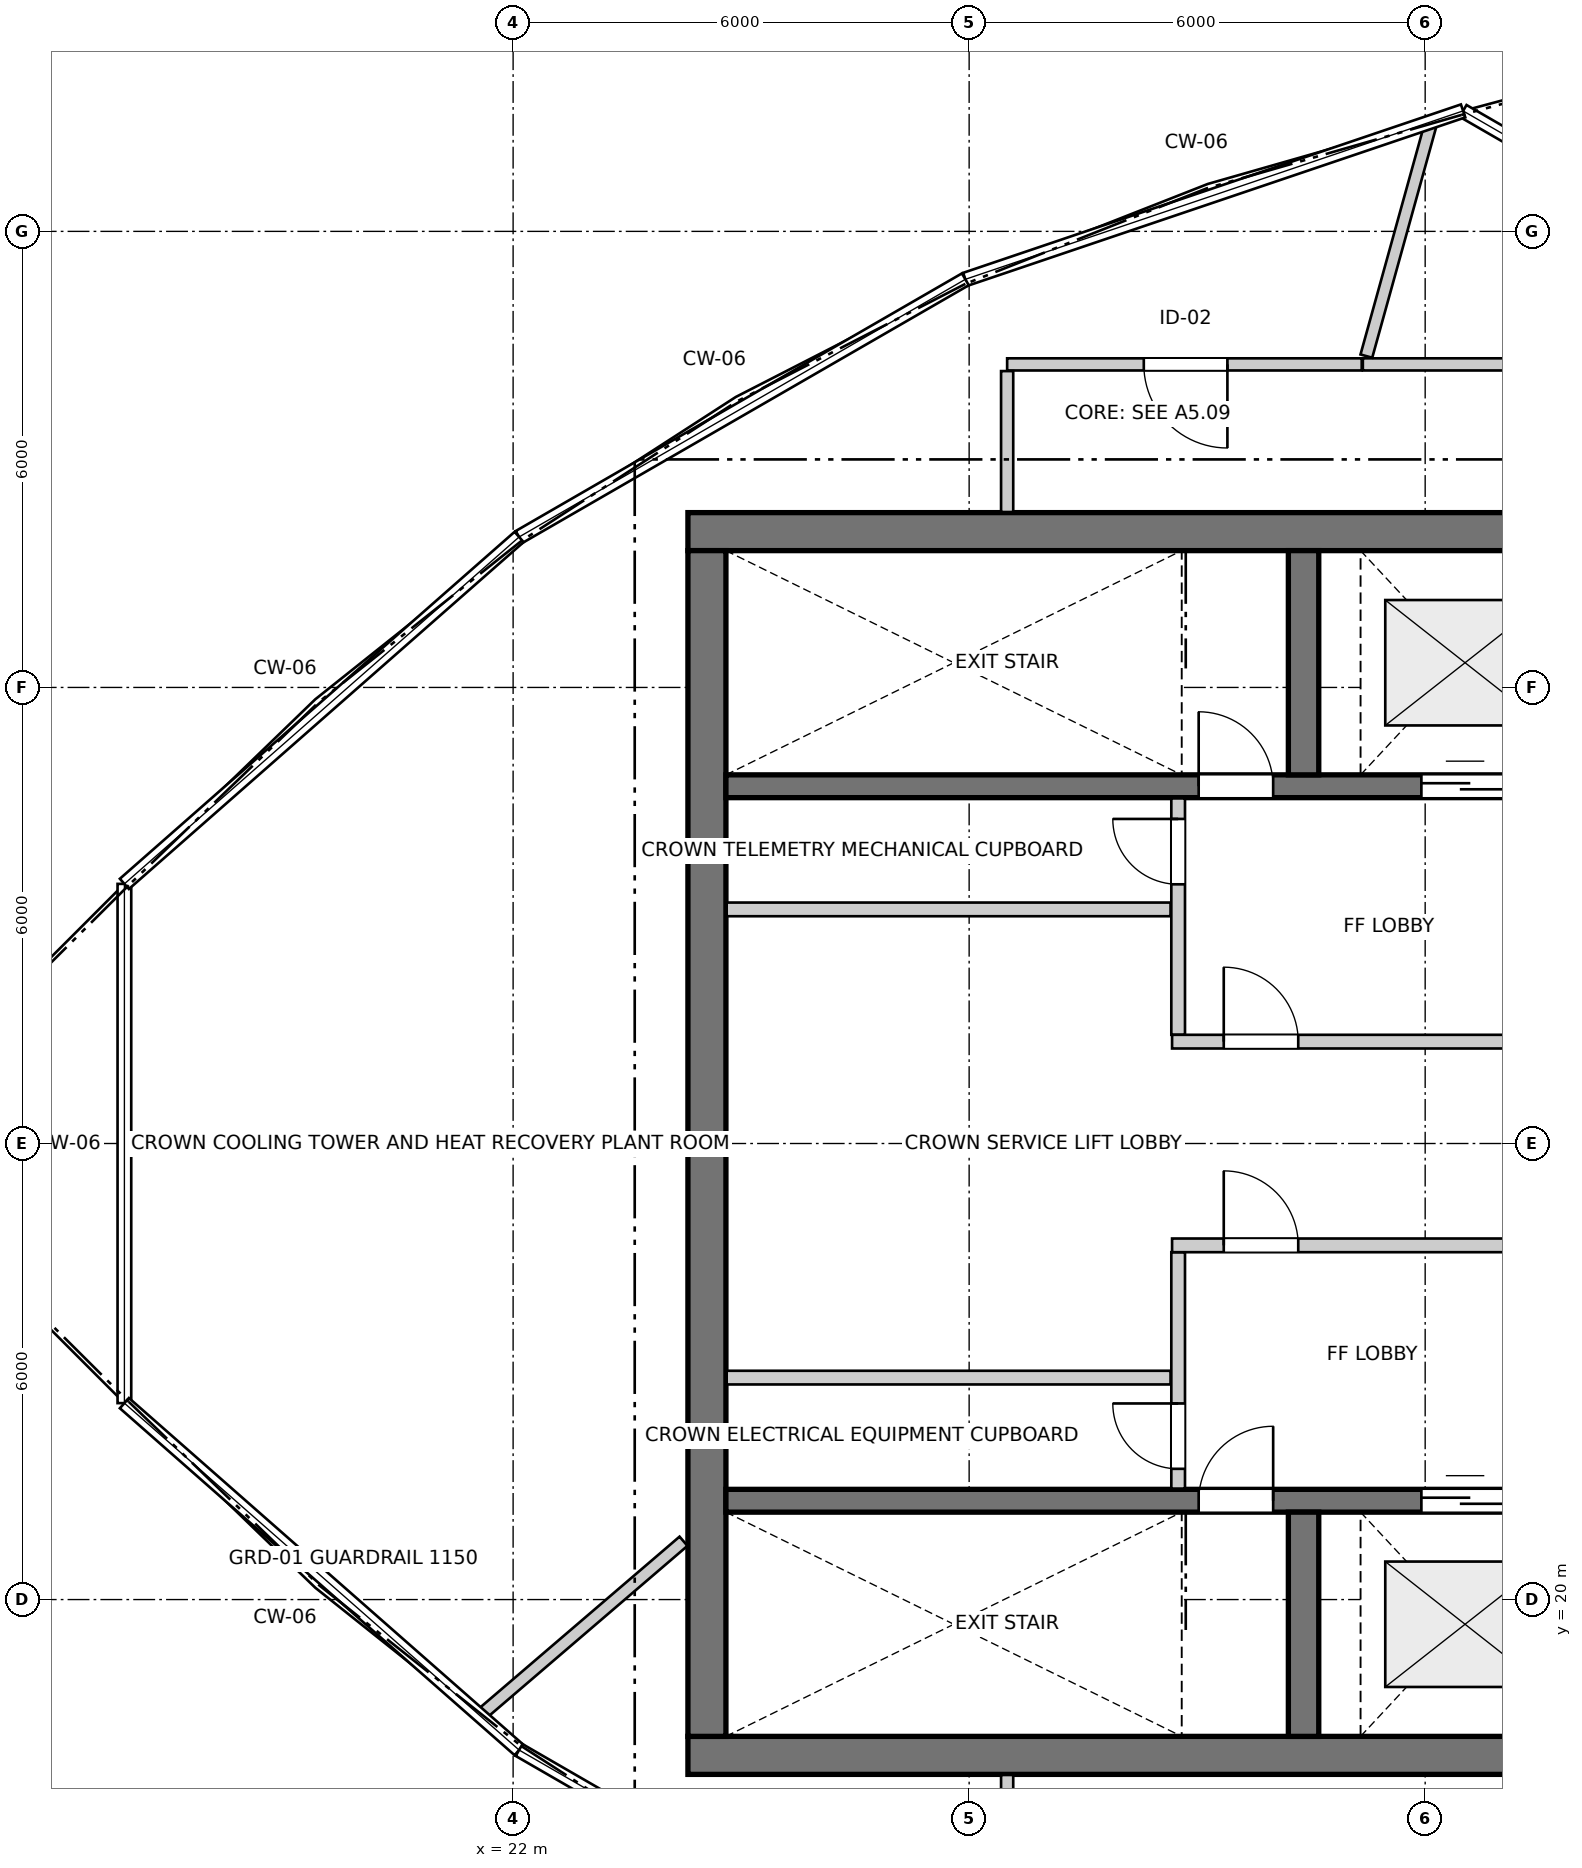
"""IFC4 building model, lengths in metres.
Left out: names, types, materials, properties, quantities, classifications, styles, units other than length and angle.
Written with IfcOpenShell. Run it as: python <this file> out.ifc"""

import sys

from ifc_helpers import new_model, si_unit, direction, frame, frame_2d, origin, place, context, subcontext, project, spatial, rectangle, extrude, source, transform, mapped, element, fill, save


model = new_model("IFC4")
c1 = context("Model", 3, precision=1e-05, world=origin(), true_north=direction((0.0, 1.0)))
c2 = subcontext(c1, "Body", "Model", "MODEL_VIEW")
j1 = project(units=[si_unit("LENGTHUNIT", "METRE"), si_unit("PLANEANGLEUNIT", "RADIAN")], contexts=[c1])
p1 = place(None, origin())
s1 = spatial("IfcSite", under=j1, at=p1, CompositionType="ELEMENT")
p2 = place(p1, origin())
s2 = spatial("IfcBuilding", under=s1, at=p2, CompositionType="ELEMENT")
p3 = place(p2, frame((0.0, 0.0, 274.7)))
s3 = spatial("IfcBuildingStorey", under=s2, at=p3, CompositionType="ELEMENT", Elevation=274.7)
for number, where, z_axis, x_axis in (
    (1, (24.3, 17.95, 0.0), (0.0, 0.0, 1.0), (1.0, 0.0, 0.0)),
    (2, (36.4, 34.05, 0.0), (0.0, 0.0, 1.0), (-1.0, 0.0, 0.0)),
):
    element("IfcWall", number, at=place(p3, frame(where, z_axis=z_axis, x_axis=x_axis)), inside=s3, PredefinedType="SHEAR", context=c2, shape_type="SweptSolid", body=[
        extrude(rectangle(XDim=12.1, YDim=0.5, at=frame_2d((6.05, 0.0))), origin(), (0.0, 0.0, 1.0), 3.062),
    ])
p4 = place(p3, frame((24.55, 33.8, 0.0), z_axis=(0.0, 0.0, 1.0), x_axis=(0.0, -1.0, 0.0)))
e3 = element("IfcWall", 3, at=p4, inside=s3, PredefinedType="SHEAR", context=c2, shape_type="SweptSolid", body=[
    extrude(rectangle(XDim=15.6, YDim=0.5, at=frame_2d((7.8, 0.0))), origin(), (0.0, 0.0, 1.0), 3.062),
])
p5 = place(p3, frame((24.8, 21.3, 0.0), z_axis=(0.0, 0.0, 1.0), x_axis=(1.0, 0.0, 0.0)))
e4 = element("IfcWall", 4, at=p5, inside=s3, PredefinedType="SHEAR", context=c2, shape_type="SweptSolid", body=[
    extrude(rectangle(XDim=11.1, YDim=0.3, at=frame_2d((5.55, 0.0))), origin(), (0.0, 0.0, 1.0), 3.062),
])
p6 = place(p5, frame((6.22, 0.0, 0.0)))
e5 = element("IfcOpeningElement", 5, at=p6, cuts=e4, PredefinedType="OPENING", context=c2, shape_type="SweptSolid", body=[
    extrude(rectangle(XDim=0.98, YDim=2.15, at=frame_2d((0.49, 1.075))), frame((0.0, 0.16, 0.0), z_axis=(0.0, -1.0, 0.0), x_axis=(1.0, 0.0, 0.0)), (0.0, 0.0, 1.0), 0.32),
])
p7 = place(p5, frame((9.15, 0.0, 0.0)))
e6 = element("IfcOpeningElement", 6, at=p7, cuts=e4, PredefinedType="OPENING", context=c2, shape_type="SweptSolid", body=[
    extrude(rectangle(XDim=1.15, YDim=2.15, at=frame_2d((0.575, 1.075))), frame((0.0, 0.16, 0.0), z_axis=(0.0, -1.0, 0.0), x_axis=(1.0, 0.0, 0.0)), (0.0, 0.0, 1.0), 0.32),
])
p8 = place(p3, frame((32.4, 18.2, 0.0), z_axis=(0.0, 0.0, 1.0), x_axis=(0.0, 1.0, 0.0)))
e7 = element("IfcWall", 7, at=p8, inside=s3, PredefinedType="SHEAR", context=c2, shape_type="SweptSolid", body=[
    extrude(rectangle(XDim=2.95, YDim=0.4, at=frame_2d((1.475, 0.0))), origin(), (0.0, 0.0, 1.0), 3.062),
])
p9 = place(p3, frame((24.8, 30.7, 0.0), z_axis=(0.0, 0.0, 1.0), x_axis=(1.0, 0.0, 0.0)))
e8 = element("IfcWall", 8, at=p9, inside=s3, PredefinedType="SHEAR", context=c2, shape_type="SweptSolid", body=[
    extrude(rectangle(XDim=11.1, YDim=0.3, at=frame_2d((5.55, 0.0))), origin(), (0.0, 0.0, 1.0), 3.062),
])
p10 = place(p9, frame((6.22, 0.0, 0.0)))
e9 = element("IfcOpeningElement", 9, at=p10, cuts=e8, PredefinedType="OPENING", context=c2, shape_type="SweptSolid", body=[
    extrude(rectangle(XDim=0.98, YDim=2.15, at=frame_2d((0.49, 1.075))), frame((0.0, 0.16, 0.0), z_axis=(0.0, -1.0, 0.0), x_axis=(1.0, 0.0, 0.0)), (0.0, 0.0, 1.0), 0.32),
])
p11 = place(p9, frame((9.15, 0.0, 0.0)))
e10 = element("IfcOpeningElement", 10, at=p11, cuts=e8, PredefinedType="OPENING", context=c2, shape_type="SweptSolid", body=[
    extrude(rectangle(XDim=1.15, YDim=2.15, at=frame_2d((0.575, 1.075))), frame((0.0, 0.16, 0.0), z_axis=(0.0, -1.0, 0.0), x_axis=(1.0, 0.0, 0.0)), (0.0, 0.0, 1.0), 0.32),
])
p12 = place(p3, frame((32.4, 30.85, 0.0), z_axis=(0.0, 0.0, 1.0), x_axis=(0.0, 1.0, 0.0)))
e11 = element("IfcWall", 11, at=p12, inside=s3, PredefinedType="SHEAR", context=c2, shape_type="SweptSolid", body=[
    extrude(rectangle(XDim=2.95, YDim=0.4, at=frame_2d((1.475, 0.0))), origin(), (0.0, 0.0, 1.0), 3.062),
])
p13 = place(p3, frame((30.75, 21.46, 0.0), z_axis=(0.0, 0.0, 1.0), x_axis=(0.0, 1.0, 0.0)))
e12 = element("IfcWall", 12, at=p13, inside=s3, PredefinedType="PARTITIONING", context=c2, shape_type="SweptSolid", body=[
    extrude(rectangle(XDim=3.11, YDim=0.18, at=frame_2d((1.555, 0.0))), origin(), (0.0, 0.0, 1.0), 2.23),
])
p14 = place(p13, frame((0.26, 0.0, 0.0)))
e13 = element("IfcOpeningElement", 13, at=p14, cuts=e12, PredefinedType="OPENING", context=c2, shape_type="SweptSolid", body=[
    extrude(rectangle(XDim=0.86, YDim=2.05, at=frame_2d((0.43, 1.025))), frame((0.0, 0.1, 0.0), z_axis=(0.0, -1.0, 0.0), x_axis=(1.0, 0.0, 0.0)), (0.0, 0.0, 1.0), 0.2),
])
p15 = place(p3, frame((30.67, 24.66, 0.0), z_axis=(0.0, 0.0, 1.0), x_axis=(1.0, 0.0, 0.0)))
e14 = element("IfcWall", 14, at=p15, inside=s3, PredefinedType="PARTITIONING", context=c2, shape_type="SweptSolid", body=[
    extrude(rectangle(XDim=5.22, YDim=0.18, at=frame_2d((2.61, 0.0))), origin(), (0.0, 0.0, 1.0), 2.23),
])
p16 = place(p15, frame((0.68, 0.0, 0.0)))
e15 = element("IfcOpeningElement", 15, at=p16, cuts=e14, PredefinedType="OPENING", context=c2, shape_type="SweptSolid", body=[
    extrude(rectangle(XDim=0.98, YDim=2.15, at=frame_2d((0.49, 1.075))), frame((0.0, 0.1, 0.0), z_axis=(0.0, -1.0, 0.0), x_axis=(1.0, 0.0, 0.0)), (0.0, 0.0, 1.0), 0.2),
])
p17 = place(p3, frame((30.75, 27.43, 0.0), z_axis=(0.0, 0.0, 1.0), x_axis=(0.0, 1.0, 0.0)))
e16 = element("IfcWall", 16, at=p17, inside=s3, PredefinedType="PARTITIONING", context=c2, shape_type="SweptSolid", body=[
    extrude(rectangle(XDim=3.11, YDim=0.18, at=frame_2d((1.555, 0.0))), origin(), (0.0, 0.0, 1.0), 2.23),
])
p18 = place(p17, frame((1.98, 0.0, 0.0)))
e17 = element("IfcOpeningElement", 17, at=p18, cuts=e16, PredefinedType="OPENING", context=c2, shape_type="SweptSolid", body=[
    extrude(rectangle(XDim=0.86, YDim=2.05, at=frame_2d((0.43, 1.025))), frame((0.0, 0.1, 0.0), z_axis=(0.0, -1.0, 0.0), x_axis=(1.0, 0.0, 0.0)), (0.0, 0.0, 1.0), 0.2),
])
p19 = place(p3, frame((30.67, 27.34, 0.0), z_axis=(0.0, 0.0, 1.0), x_axis=(1.0, 0.0, 0.0)))
e18 = element("IfcWall", 18, at=p19, inside=s3, PredefinedType="PARTITIONING", context=c2, shape_type="SweptSolid", body=[
    extrude(rectangle(XDim=5.22, YDim=0.18, at=frame_2d((2.61, 0.0))), origin(), (0.0, 0.0, 1.0), 2.23),
])
p20 = place(p19, frame((0.68, 0.0, 0.0)))
e19 = element("IfcOpeningElement", 19, at=p20, cuts=e18, PredefinedType="OPENING", context=c2, shape_type="SweptSolid", body=[
    extrude(rectangle(XDim=0.98, YDim=2.15, at=frame_2d((0.49, 1.075))), frame((0.0, 0.1, 0.0), z_axis=(0.0, -1.0, 0.0), x_axis=(1.0, 0.0, 0.0)), (0.0, 0.0, 1.0), 0.2),
])
for number, where, z_axis, x_axis in (
    (20, (24.81, 22.92, 0.0), (0.0, 0.0, 1.0), (1.0, 0.0, 0.0)),
    (21, (24.81, 29.08, 0.0), (0.0, 0.0, 1.0), (1.0, 0.0, 0.0)),
):
    element("IfcWall", number, at=place(p3, frame(where, z_axis=z_axis, x_axis=x_axis)), inside=s3, PredefinedType="PARTITIONING", context=c2, shape_type="SweptSolid", body=[
        extrude(rectangle(XDim=5.84, YDim=0.18, at=frame_2d((2.92, 0.0))), origin(), (0.0, 0.0, 1.0), 2.23),
    ])
p21 = place(p3, frame((33.165, 36.25, 0.0), z_axis=(0.0, 0.0, 1.0), x_axis=(-1.0, 0.0, 0.0)))
e22 = element("IfcWall", 22, at=p21, inside=s3, PredefinedType="PARTITIONING", context=c2, shape_type="SweptSolid", body=[
    extrude(rectangle(XDim=4.665, YDim=0.16, at=frame_2d((2.333, 0.0))), origin(), (0.0, 0.0, 1.0), 2.23),
])
p22 = place(p21, frame((1.767, 0.0, 0.0)))
e23 = element("IfcOpeningElement", 23, at=p22, cuts=e22, PredefinedType="OPENING", context=c2, shape_type="SweptSolid", body=[
    extrude(rectangle(XDim=1.1, YDim=2.15, at=frame_2d((0.55, 1.075))), frame((0.0, 0.09, 0.0), z_axis=(0.0, -1.0, 0.0), x_axis=(1.0, 0.0, 0.0)), (0.0, 0.0, 1.0), 0.18),
])
p23 = place(p3, frame((33.18, 36.25, 0.0), z_axis=(0.0, 0.0, 1.0), x_axis=(1.0, 0.0, 0.0)))
e24 = element("IfcWall", 24, at=p23, inside=s3, PredefinedType="PARTITIONING", context=c2, shape_type="SweptSolid", body=[
    extrude(rectangle(XDim=5.382, YDim=0.16, at=frame_2d((2.691, 0.0))), origin(), (0.0, 0.0, 1.0), 2.23),
])
p24 = place(p3, frame((21.585, 18.49, 0.0), z_axis=(0.0, 0.0, 1.0), x_axis=(0.75939941165, 0.650624725619, 0.0)))
e25 = element("IfcWall", 25, at=p24, inside=s3, PredefinedType="PARTITIONING", context=c2, shape_type="SweptSolid", body=[
    extrude(rectangle(XDim=3.499, YDim=0.16, at=frame_2d((1.75, 0.0))), origin(), (0.0, 0.0, 1.0), 2.23),
])
p25 = place(p3, frame((33.226, 36.359, 0.0), z_axis=(0.0, 0.0, 1.0), x_axis=(0.267310296681, 0.96361050497, 0.0)))
e26 = element("IfcWall", 26, at=p25, inside=s3, PredefinedType="PARTITIONING", context=c2, shape_type="SweptSolid", body=[
    extrude(rectangle(XDim=3.171, YDim=0.16, at=frame_2d((1.585, 0.0))), origin(), (0.0, 0.0, 1.0), 2.23),
])
for number, where, z_axis, x_axis in (
    (27, (28.5, 34.308, 0.0), (0.0, 0.0, 1.0), (0.0, 1.0, 0.0)),
    (28, (28.5, 15.838, 0.0), (0.0, 0.0, 1.0), (0.0, 1.0, 0.0)),
):
    element("IfcWall", number, at=place(p3, frame(where, z_axis=z_axis, x_axis=x_axis)), inside=s3, PredefinedType="PARTITIONING", context=c2, shape_type="SweptSolid", body=[
        extrude(rectangle(XDim=1.854, YDim=0.16, at=frame_2d((0.927, 0.0))), origin(), (0.0, 0.0, 1.0), 2.23),
    ])
m1 = source(origin(), c2, "Body", "SweptSolid", [
    extrude(rectangle(XDim=0.98, YDim=2.15, at=frame_2d((0.49, 1.075))), frame((0.0, 0.025, 0.0), z_axis=(0.0, -1.0, 0.0), x_axis=(1.0, 0.0, 0.0)), (0.0, 0.0, 1.0), 0.05),
])
p26 = place(p6, origin())
e29 = element("IfcDoor", 29, at=p26, inside=s3, OperationType="SINGLE_SWING_RIGHT", PredefinedType="DOOR", context=c2, shape_type="MappedRepresentation", body=[
    mapped(m1, transform((0.0, 0.0, 0.0), x_axis=(1.0, 0.0, 0.0), y_axis=(0.0, 1.0, 0.0), z_axis=(0.0, 0.0, 1.0), scale=1.0)),
])
fill(e5, e29)
m2 = source(origin(), c2, "Body", "SweptSolid", [
    extrude(rectangle(XDim=1.15, YDim=2.15, at=frame_2d((0.575, 1.075))), frame((0.0, 0.025, 0.0), z_axis=(0.0, -1.0, 0.0), x_axis=(1.0, 0.0, 0.0)), (0.0, 0.0, 1.0), 0.05),
])
p27 = place(p7, origin())
e30 = element("IfcDoor", 30, at=p27, inside=s3, OperationType="DOUBLE_DOOR_SLIDING", PredefinedType="DOOR", context=c2, shape_type="MappedRepresentation", body=[
    mapped(m2, transform((0.0, 0.0, 0.0), x_axis=(1.0, 0.0, 0.0), y_axis=(0.0, 1.0, 0.0), z_axis=(0.0, 0.0, 1.0), scale=1.0)),
])
fill(e6, e30)
p28 = place(p10, origin())
e31 = element("IfcDoor", 31, at=p28, inside=s3, OperationType="SINGLE_SWING_LEFT", PredefinedType="DOOR", context=c2, shape_type="MappedRepresentation", body=[
    mapped(m1, transform((0.0, 0.0, 0.0), x_axis=(1.0, 0.0, 0.0), y_axis=(0.0, 1.0, 0.0), z_axis=(0.0, 0.0, 1.0), scale=1.0)),
])
fill(e9, e31)
p29 = place(p11, origin())
e32 = element("IfcDoor", 32, at=p29, inside=s3, OperationType="DOUBLE_DOOR_SLIDING", PredefinedType="DOOR", context=c2, shape_type="MappedRepresentation", body=[
    mapped(m2, transform((0.0, 0.0, 0.0), x_axis=(1.0, 0.0, 0.0), y_axis=(0.0, 1.0, 0.0), z_axis=(0.0, 0.0, 1.0), scale=1.0)),
])
fill(e10, e32)
m3 = source(origin(), c2, "Body", "SweptSolid", [
    extrude(rectangle(XDim=0.86, YDim=2.05, at=frame_2d((0.43, 1.025))), frame((0.0, 0.025, 0.0), z_axis=(0.0, -1.0, 0.0), x_axis=(1.0, 0.0, 0.0)), (0.0, 0.0, 1.0), 0.05),
])
p30 = place(p14, origin())
e33 = element("IfcDoor", 33, at=p30, inside=s3, OperationType="SINGLE_SWING_RIGHT", PredefinedType="DOOR", context=c2, shape_type="MappedRepresentation", body=[
    mapped(m3, transform((0.0, 0.0, 0.0), x_axis=(1.0, 0.0, 0.0), y_axis=(0.0, 1.0, 0.0), z_axis=(0.0, 0.0, 1.0), scale=1.0)),
])
fill(e13, e33)
p31 = place(p16, origin())
e34 = element("IfcDoor", 34, at=p31, inside=s3, OperationType="SINGLE_SWING_LEFT", PredefinedType="DOOR", context=c2, shape_type="MappedRepresentation", body=[
    mapped(m1, transform((0.0, 0.0, 0.0), x_axis=(1.0, 0.0, 0.0), y_axis=(0.0, 1.0, 0.0), z_axis=(0.0, 0.0, 1.0), scale=1.0)),
])
fill(e15, e34)
p32 = place(p18, origin())
e35 = element("IfcDoor", 35, at=p32, inside=s3, OperationType="SINGLE_SWING_RIGHT", PredefinedType="DOOR", context=c2, shape_type="MappedRepresentation", body=[
    mapped(m3, transform((0.0, 0.0, 0.0), x_axis=(1.0, 0.0, 0.0), y_axis=(0.0, 1.0, 0.0), z_axis=(0.0, 0.0, 1.0), scale=1.0)),
])
fill(e17, e35)
p33 = place(p20, origin())
e36 = element("IfcDoor", 36, at=p33, inside=s3, OperationType="SINGLE_SWING_LEFT", PredefinedType="DOOR", context=c2, shape_type="MappedRepresentation", body=[
    mapped(m1, transform((0.0, 0.0, 0.0), x_axis=(1.0, 0.0, 0.0), y_axis=(0.0, 1.0, 0.0), z_axis=(0.0, 0.0, 1.0), scale=1.0)),
])
fill(e19, e36)
m4 = source(origin(), c2, "Body", "SweptSolid", [
    extrude(rectangle(XDim=1.1, YDim=2.15, at=frame_2d((0.55, 1.075))), frame((0.0, 0.025, 0.0), z_axis=(0.0, -1.0, 0.0), x_axis=(1.0, 0.0, 0.0)), (0.0, 0.0, 1.0), 0.05),
])
p34 = place(p22, origin())
e37 = element("IfcDoor", 37, at=p34, inside=s3, OperationType="SINGLE_SWING_LEFT", PredefinedType="DOOR", context=c2, shape_type="MappedRepresentation", body=[
    mapped(m4, transform((0.0, 0.0, 0.0), x_axis=(1.0, 0.0, 0.0), y_axis=(0.0, 1.0, 0.0), z_axis=(0.0, 0.0, 1.0), scale=1.0)),
])
fill(e23, e37)
save(model, sys.argv[1])
